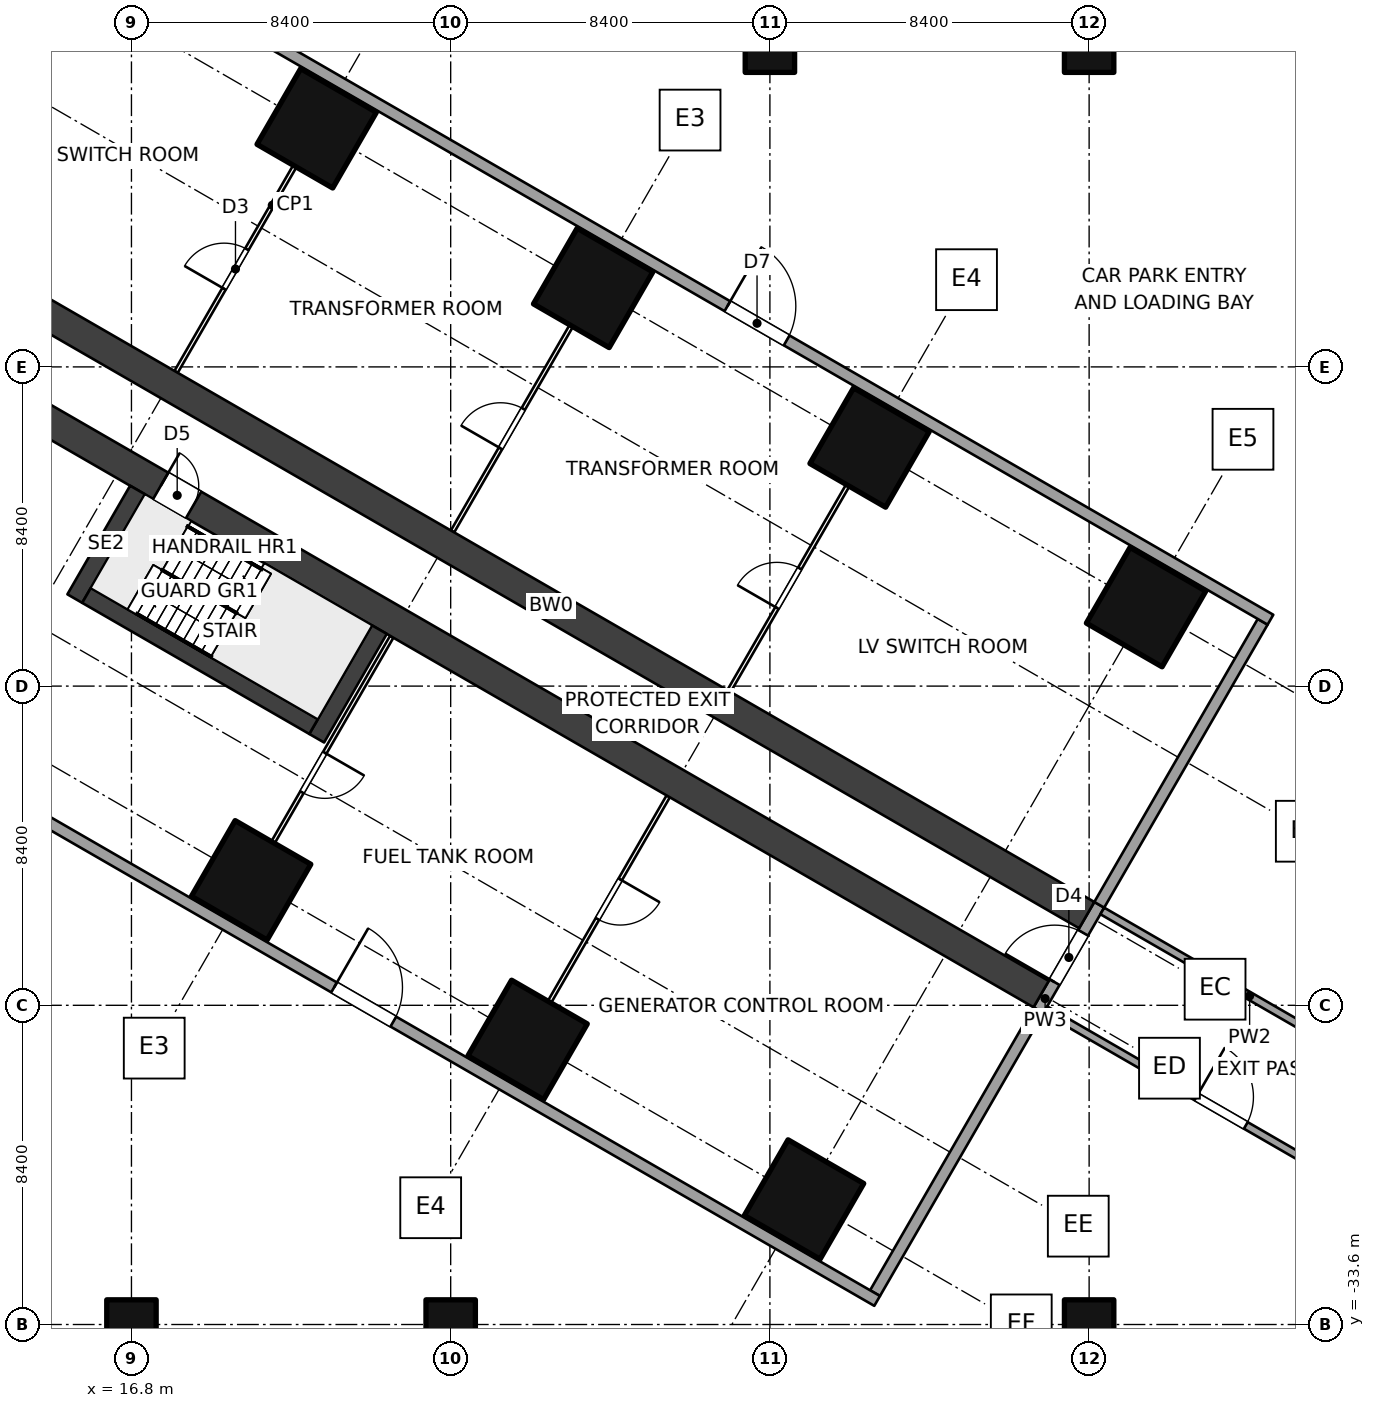
"""IFC4 building model, lengths in metres.
Left out: names, types, materials, properties, quantities, classifications, styles, units other than length and angle.
Written with IfcOpenShell. Run it as: python <this file> out.ifc"""

import sys

from ifc_helpers import new_model, si_unit, direction, frame, frame_2d, origin, origin_2d, place, context, subcontext, project, spatial, rectangle, extrude, element, fill, save


model = new_model("IFC4")
c1 = context("Model", 3, precision=1e-05, world=origin(), true_north=direction((0.0, 1.0)))
c2 = subcontext(c1, "Body", "Model", "MODEL_VIEW")
j1 = project(units=[si_unit("LENGTHUNIT", "METRE"), si_unit("PLANEANGLEUNIT", "RADIAN")], contexts=[c1])
p1 = place(None, origin())
s1 = spatial("IfcSite", under=j1, at=p1, CompositionType="ELEMENT")
p2 = place(p1, origin())
s2 = spatial("IfcBuilding", under=s1, at=p2, CompositionType="ELEMENT")
p3 = place(p2, origin())
s3 = spatial("IfcBuildingStorey", under=s2, at=p3, CompositionType="ELEMENT", Elevation=0.0)
for number, where, z_axis, x_axis in (
    (1, (21.675, -2.122, 0.0), (0.0, 0.0, 1.0), (-0.5, -0.866, 0.0)),
    (2, (28.949, -6.322, 0.0), (0.0, 0.0, 1.0), (-0.5, -0.866, 0.0)),
    (3, (19.949, -21.91, 0.0), (0.0, 0.0, 1.0), (-0.5, -0.866, 0.0)),
    (4, (36.224, -10.521, 0.0), (0.0, 0.0, 1.0), (-0.5, -0.866, 0.0)),
    (5, (27.224, -26.11, 0.0), (0.0, 0.0, 1.0), (-0.5, -0.866, 0.0)),
    (6, (43.499, -14.721, 0.0), (0.0, 0.0, 1.0), (-0.5, -0.866, 0.0)),
    (7, (34.499, -30.31, 0.0), (0.0, 0.0, 1.0), (-0.5, -0.866, 0.0)),
):
    element("IfcColumn", number, at=place(p3, frame(where, z_axis=z_axis, x_axis=x_axis)), inside=s3, PredefinedType="COLUMN", context=c2, shape_type="SweptSolid", body=[
        extrude(rectangle(XDim=2.3, YDim=2.3, at=origin_2d()), origin(), (0.0, 0.0, 1.0), 6.0),
    ])
for number, where, z_axis, x_axis in (
    (8, (16.8, -33.6, 0.0), (0.0, 0.0, 1.0), (1.0, 0.0, 0.0)),
    (9, (25.2, -33.6, 0.0), (0.0, 0.0, 1.0), (1.0, 0.0, 0.0)),
    (10, (33.6, 0.0, 0.0), (0.0, 0.0, 1.0), (1.0, 0.0, 0.0)),
    (11, (42.0, -33.6, 0.0), (0.0, 0.0, 1.0), (1.0, 0.0, 0.0)),
    (12, (42.0, 0.0, 0.0), (0.0, 0.0, 1.0), (1.0, 0.0, 0.0)),
):
    element("IfcColumn", number, at=place(p3, frame(where, z_axis=z_axis, x_axis=x_axis)), inside=s3, PredefinedType="COLUMN", context=c2, shape_type="SweptSolid", body=[
        extrude(rectangle(XDim=1.3, YDim=1.3, at=origin_2d()), origin(), (0.0, 0.0, 1.0), 6.0),
    ])
p4 = place(p3, frame((10.11, -4.451, 0.0), z_axis=(0.0, 0.0, 1.0), x_axis=(0.866025284237, -0.500000207062, 0.0)))
e13 = element("IfcWall", 13, at=p4, inside=s3, PredefinedType="SHEAR", context=c2, shape_type="SweptSolid", body=[
    extrude(rectangle(XDim=36.75, YDim=0.8, at=frame_2d((18.375, 0.0))), origin(), (0.0, 0.0, 1.0), 6.0),
])
p5 = place(p4, frame((2.85, 0.0, 0.0)))
e14 = element("IfcOpeningElement", 14, at=p5, cuts=e13, PredefinedType="OPENING", context=c2, shape_type="SweptSolid", body=[
    extrude(rectangle(XDim=1.2, YDim=2.1, at=frame_2d((0.6, 1.05))), frame((0.0, 0.41, 0.0), z_axis=(0.0, -1.0, 0.0), x_axis=(1.0, 0.0, 0.0)), (0.0, 0.0, 1.0), 0.82),
])
p6 = place(p3, frame((8.91, -6.53, 0.0), z_axis=(0.0, 0.0, 1.0), x_axis=(0.866025284237, -0.500000207062, 0.0)))
e15 = element("IfcWall", 15, at=p6, inside=s3, PredefinedType="SHEAR", context=c2, shape_type="SweptSolid", body=[
    extrude(rectangle(XDim=36.75, YDim=0.8, at=frame_2d((18.375, 0.0))), origin(), (0.0, 0.0, 1.0), 6.0),
])
p7 = place(p6, frame((10.0, 0.0, 0.0)))
e16 = element("IfcOpeningElement", 16, at=p7, cuts=e15, PredefinedType="OPENING", context=c2, shape_type="SweptSolid", body=[
    extrude(rectangle(XDim=1.0, YDim=2.1, at=frame_2d((0.5, 1.05))), frame((0.0, 0.41, 0.0), z_axis=(0.0, -1.0, 0.0), x_axis=(1.0, 0.0, 0.0)), (0.0, 0.0, 1.0), 0.82),
])
p8 = place(p6, frame((2.85, 0.0, 0.0)))
e17 = element("IfcOpeningElement", 17, at=p8, cuts=e15, PredefinedType="OPENING", context=c2, shape_type="SweptSolid", body=[
    extrude(rectangle(XDim=1.2, YDim=2.1, at=frame_2d((0.6, 1.05))), frame((0.0, 0.41, 0.0), z_axis=(0.0, -1.0, 0.0), x_axis=(1.0, 0.0, 0.0)), (0.0, 0.0, 1.0), 0.82),
])
p9 = place(p3, frame((17.975, -8.53, 0.0), z_axis=(0.0, 0.0, 1.0), x_axis=(0.500004234368, 0.866022959057, 0.0)))
e18 = element("IfcWall", 18, at=p9, inside=s3, PredefinedType="PARTITIONING", context=c2, shape_type="SweptSolid", body=[
    extrude(rectangle(XDim=6.25, YDim=0.1, at=frame_2d((3.125, 0.0))), origin(), (0.0, 0.0, 1.0), 3.9),
])
p10 = place(p9, frame((2.525, 0.0, 0.0)))
e19 = element("IfcOpeningElement", 19, at=p10, cuts=e18, PredefinedType="OPENING", context=c2, shape_type="SweptSolid", body=[
    extrude(rectangle(XDim=1.2, YDim=2.1, at=frame_2d((0.6, 1.05))), frame((0.0, 0.06, 0.0), z_axis=(0.0, -1.0, 0.0), x_axis=(1.0, 0.0, 0.0)), (0.0, 0.0, 1.0), 0.12),
])
p11 = place(p3, frame((25.249, -12.73, 0.0), z_axis=(0.0, 0.0, 1.0), x_axis=(0.499987320047, 0.866032724435, 0.0)))
e20 = element("IfcWall", 20, at=p11, inside=s3, PredefinedType="PARTITIONING", context=c2, shape_type="SweptSolid", body=[
    extrude(rectangle(XDim=6.25, YDim=0.1, at=frame_2d((3.125, 0.0))), origin(), (0.0, 0.0, 1.0), 3.9),
])
p12 = place(p11, frame((2.525, 0.0, 0.0)))
e21 = element("IfcOpeningElement", 21, at=p12, cuts=e20, PredefinedType="OPENING", context=c2, shape_type="SweptSolid", body=[
    extrude(rectangle(XDim=1.2, YDim=2.1, at=frame_2d((0.6, 1.05))), frame((0.0, 0.06, 0.0), z_axis=(0.0, -1.0, 0.0), x_axis=(1.0, 0.0, 0.0)), (0.0, 0.0, 1.0), 0.12),
])
p13 = place(p3, frame((32.524, -16.93, 0.0), z_axis=(0.0, 0.0, 1.0), x_axis=(0.500004234368, 0.866022959057, 0.0)))
e22 = element("IfcWall", 22, at=p13, inside=s3, PredefinedType="PARTITIONING", context=c2, shape_type="SweptSolid", body=[
    extrude(rectangle(XDim=6.25, YDim=0.1, at=frame_2d((3.125, 0.0))), origin(), (0.0, 0.0, 1.0), 3.9),
])
p14 = place(p13, frame((2.525, 0.0, 0.0)))
e23 = element("IfcOpeningElement", 23, at=p14, cuts=e22, PredefinedType="OPENING", context=c2, shape_type="SweptSolid", body=[
    extrude(rectangle(XDim=1.2, YDim=2.1, at=frame_2d((0.6, 1.05))), frame((0.0, 0.06, 0.0), z_axis=(0.0, -1.0, 0.0), x_axis=(1.0, 0.0, 0.0)), (0.0, 0.0, 1.0), 0.12),
])
p15 = place(p3, frame((23.649, -15.501, 0.0), z_axis=(0.0, 0.0, 1.0), x_axis=(-0.500004234368, -0.866022959057, 0.0)))
e24 = element("IfcWall", 24, at=p15, inside=s3, PredefinedType="PARTITIONING", context=c2, shape_type="SweptSolid", body=[
    extrude(rectangle(XDim=6.25, YDim=0.1, at=frame_2d((3.125, 0.0))), origin(), (0.0, 0.0, 1.0), 3.9),
])
p16 = place(p15, frame((3.525, 0.0, 0.0)))
e25 = element("IfcOpeningElement", 25, at=p16, cuts=e24, PredefinedType="OPENING", context=c2, shape_type="SweptSolid", body=[
    extrude(rectangle(XDim=1.2, YDim=2.1, at=frame_2d((0.6, 1.05))), frame((0.0, 0.06, 0.0), z_axis=(0.0, -1.0, 0.0), x_axis=(1.0, 0.0, 0.0)), (0.0, 0.0, 1.0), 0.12),
])
p17 = place(p3, frame((30.924, -19.701, 0.0), z_axis=(0.0, 0.0, 1.0), x_axis=(-0.500004234368, -0.866022959057, 0.0)))
e26 = element("IfcWall", 26, at=p17, inside=s3, PredefinedType="PARTITIONING", context=c2, shape_type="SweptSolid", body=[
    extrude(rectangle(XDim=6.25, YDim=0.1, at=frame_2d((3.125, 0.0))), origin(), (0.0, 0.0, 1.0), 3.9),
])
p18 = place(p17, frame((2.525, 0.0, 0.0)))
e27 = element("IfcOpeningElement", 27, at=p18, cuts=e26, PredefinedType="OPENING", context=c2, shape_type="SweptSolid", body=[
    extrude(rectangle(XDim=1.2, YDim=2.1, at=frame_2d((0.6, 1.05))), frame((0.0, 0.06, 0.0), z_axis=(0.0, -1.0, 0.0), x_axis=(1.0, 0.0, 0.0)), (0.0, 0.0, 1.0), 0.12),
])
p19 = place(p3, frame((40.667, -25.326, 0.0), z_axis=(0.0, 0.0, 1.0), x_axis=(0.499971222258, 0.866042017984, 0.0)))
e28 = element("IfcWall", 28, at=p19, inside=s3, PredefinedType="SOLIDWALL", context=c2, shape_type="SweptSolid", body=[
    extrude(rectangle(XDim=3.2, YDim=0.3, at=frame_2d((1.6, 0.0))), origin(), (0.0, 0.0, 1.0), 5.7),
])
p20 = place(p19, frame((0.85, 0.0, 0.0)))
e29 = element("IfcOpeningElement", 29, at=p20, cuts=e28, PredefinedType="OPENING", context=c2, shape_type="SweptSolid", body=[
    extrude(rectangle(XDim=1.5, YDim=2.1, at=frame_2d((0.75, 1.05))), frame((0.0, 0.16, 0.0), z_axis=(0.0, -1.0, 0.0), x_axis=(1.0, 0.0, 0.0)), (0.0, 0.0, 1.0), 0.32),
])
p21 = place(p3, frame((42.346, -22.717, 0.0), z_axis=(0.0, 0.0, 1.0), x_axis=(0.866038004836, -0.499978173704, 0.0)))
e30 = element("IfcWall", 30, at=p21, inside=s3, PredefinedType="SOLIDWALL", context=c2, shape_type="SweptSolid", body=[
    extrude(rectangle(XDim=8.953, YDim=0.2, at=frame_2d((4.477, 0.0))), origin(), (0.0, 0.0, 1.0), 5.7),
])
p22 = place(p3, frame((40.846, -25.315, 0.0), z_axis=(0.0, 0.0, 1.0), x_axis=(0.866028443642, -0.499994734776, 0.0)))
e31 = element("IfcWall", 31, at=p22, inside=s3, PredefinedType="SOLIDWALL", context=c2, shape_type="SweptSolid", body=[
    extrude(rectangle(XDim=10.685, YDim=0.2, at=frame_2d((5.343, 0.0))), origin(), (0.0, 0.0, 1.0), 5.7),
])
p23 = place(p22, frame((4.593, 0.0, 0.0)))
e32 = element("IfcOpeningElement", 32, at=p23, cuts=e31, PredefinedType="OPENING", context=c2, shape_type="SweptSolid", body=[
    extrude(rectangle(XDim=1.5, YDim=2.1, at=frame_2d((0.75, 1.05))), frame((0.0, 0.11, 0.0), z_axis=(0.0, -1.0, 0.0), x_axis=(1.0, 0.0, 0.0)), (0.0, 0.0, 1.0), 0.22),
])
for number, where, z_axis, x_axis in (
    (33, (42.267, -22.555, 0.0), (0.0, 0.0, 1.0), (0.5, 0.866, 0.0)),
    (34, (40.667, -25.326, 0.0), (0.0, 0.0, 1.0), (-0.5, -0.866, 0.0)),
):
    element("IfcWall", number, at=place(p3, frame(where, z_axis=z_axis, x_axis=x_axis)), inside=s3, PredefinedType="SOLIDWALL", context=c2, shape_type="SweptSolid", body=[
        extrude(rectangle(XDim=8.6, YDim=0.3, at=frame_2d((4.3, 0.0))), origin(), (0.0, 0.0, 1.0), 4.1),
    ])
p24 = place(p3, frame((9.45, 6.495, 0.0), z_axis=(0.0, 0.0, 1.0), x_axis=(0.866025301493, -0.500000177174, 0.0)))
e35 = element("IfcWall", 35, at=p24, inside=s3, PredefinedType="SOLIDWALL", context=c2, shape_type="SweptSolid", body=[
    extrude(rectangle(XDim=43.095, YDim=0.3, at=frame_2d((21.548, 0.0))), origin(), (0.0, 0.0, 1.0), 5.7),
])
p25 = place(p24, frame((26.595, 0.0, 0.0)))
e36 = element("IfcOpeningElement", 36, at=p25, cuts=e35, PredefinedType="OPENING", context=c2, shape_type="SweptSolid", body=[
    extrude(rectangle(XDim=1.8, YDim=2.4, at=frame_2d((0.9, 1.2))), frame((0.0, 0.16, 0.0), z_axis=(0.0, -1.0, 0.0), x_axis=(1.0, 0.0, 0.0)), (0.0, 0.0, 1.0), 0.32),
])
p26 = place(p3, frame((-0.9, -11.432, 0.0), z_axis=(0.0, 0.0, 1.0), x_axis=(0.866025301493, -0.500000177174, 0.0)))
e37 = element("IfcWall", 37, at=p26, inside=s3, PredefinedType="SOLIDWALL", context=c2, shape_type="SweptSolid", body=[
    extrude(rectangle(XDim=43.095, YDim=0.3, at=frame_2d((21.548, 0.0))), origin(), (0.0, 0.0, 1.0), 5.7),
])
p27 = place(p26, frame((26.595, 0.0, 0.0)))
e38 = element("IfcOpeningElement", 38, at=p27, cuts=e37, PredefinedType="OPENING", context=c2, shape_type="SweptSolid", body=[
    extrude(rectangle(XDim=1.8, YDim=2.4, at=frame_2d((0.9, 1.2))), frame((0.0, 0.16, 0.0), z_axis=(0.0, -1.0, 0.0), x_axis=(1.0, 0.0, 0.0)), (0.0, 0.0, 1.0), 0.32),
])
for number, where, z_axis, x_axis in (
    (39, (16.959, -11.639, 0.0), (0.0, 0.0, 1.0), (-0.5, -0.866, 0.0)),
    (40, (23.324, -15.314, 0.0), (0.0, 0.0, 1.0), (-0.5, -0.866, 0.0)),
):
    element("IfcWall", number, at=place(p3, frame(where, z_axis=z_axis, x_axis=x_axis)), inside=s3, PredefinedType="SOLIDWALL", context=c2, shape_type="SweptSolid", body=[
        extrude(rectangle(XDim=3.3, YDim=0.45, at=frame_2d((1.65, 0.0))), origin(), (0.0, 0.0, 1.0), 6.0),
    ])
p28 = place(p3, frame((15.616, -14.415, 0.0), z_axis=(0.0, 0.0, 1.0), x_axis=(0.866028853923, -0.499994024137, 0.0)))
e41 = element("IfcWall", 41, at=p28, inside=s3, PredefinedType="SOLIDWALL", context=c2, shape_type="SweptSolid", body=[
    extrude(rectangle(XDim=6.9, YDim=0.45, at=frame_2d((3.45, 0.0))), origin(), (0.0, 0.0, 1.0), 6.0),
])
p29 = place(p7, origin())
e42 = element("IfcDoor", 42, at=p29, inside=s3, OperationType="SINGLE_SWING_LEFT", PredefinedType="DOOR", context=c2, shape_type="SweptSolid", body=[
    extrude(rectangle(XDim=1.0, YDim=2.1, at=frame_2d((0.5, 1.05))), frame((0.0, 0.025, 0.0), z_axis=(0.0, -1.0, 0.0), x_axis=(1.0, 0.0, 0.0)), (0.0, 0.0, 1.0), 0.05),
])
fill(e16, e42)
p30 = place(p10, origin())
e43 = element("IfcDoor", 43, at=p30, inside=s3, OperationType="DOUBLE_SWING_LEFT", PredefinedType="DOOR", context=c2, shape_type="SweptSolid", body=[
    extrude(rectangle(XDim=1.2, YDim=2.1, at=frame_2d((0.6, 1.05))), frame((0.0, 0.025, 0.0), z_axis=(0.0, -1.0, 0.0), x_axis=(1.0, 0.0, 0.0)), (0.0, 0.0, 1.0), 0.05),
])
fill(e19, e43)
p31 = place(p12, origin())
e44 = element("IfcDoor", 44, at=p31, inside=s3, OperationType="DOUBLE_SWING_LEFT", PredefinedType="DOOR", context=c2, shape_type="SweptSolid", body=[
    extrude(rectangle(XDim=1.2, YDim=2.1, at=frame_2d((0.6, 1.05))), frame((0.0, 0.025, 0.0), z_axis=(0.0, -1.0, 0.0), x_axis=(1.0, 0.0, 0.0)), (0.0, 0.0, 1.0), 0.05),
])
fill(e21, e44)
p32 = place(p14, origin())
e45 = element("IfcDoor", 45, at=p32, inside=s3, OperationType="DOUBLE_SWING_LEFT", PredefinedType="DOOR", context=c2, shape_type="SweptSolid", body=[
    extrude(rectangle(XDim=1.2, YDim=2.1, at=frame_2d((0.6, 1.05))), frame((0.0, 0.025, 0.0), z_axis=(0.0, -1.0, 0.0), x_axis=(1.0, 0.0, 0.0)), (0.0, 0.0, 1.0), 0.05),
])
fill(e23, e45)
p33 = place(p16, origin())
e46 = element("IfcDoor", 46, at=p33, inside=s3, OperationType="DOUBLE_SWING_LEFT", PredefinedType="DOOR", context=c2, shape_type="SweptSolid", body=[
    extrude(rectangle(XDim=1.2, YDim=2.1, at=frame_2d((0.6, 1.05))), frame((0.0, 0.025, 0.0), z_axis=(0.0, -1.0, 0.0), x_axis=(1.0, 0.0, 0.0)), (0.0, 0.0, 1.0), 0.05),
])
fill(e25, e46)
p34 = place(p18, origin())
e47 = element("IfcDoor", 47, at=p34, inside=s3, OperationType="DOUBLE_SWING_LEFT", PredefinedType="DOOR", context=c2, shape_type="SweptSolid", body=[
    extrude(rectangle(XDim=1.2, YDim=2.1, at=frame_2d((0.6, 1.05))), frame((0.0, 0.025, 0.0), z_axis=(0.0, -1.0, 0.0), x_axis=(1.0, 0.0, 0.0)), (0.0, 0.0, 1.0), 0.05),
])
fill(e27, e47)
p35 = place(p20, origin())
e48 = element("IfcDoor", 48, at=p35, inside=s3, OperationType="DOUBLE_DOOR_DOUBLE_SWING", PredefinedType="DOOR", context=c2, shape_type="SweptSolid", body=[
    extrude(rectangle(XDim=1.5, YDim=2.1, at=frame_2d((0.75, 1.05))), frame((0.0, 0.025, 0.0), z_axis=(0.0, -1.0, 0.0), x_axis=(1.0, 0.0, 0.0)), (0.0, 0.0, 1.0), 0.05),
])
fill(e29, e48)
p36 = place(p23, origin())
e49 = element("IfcDoor", 49, at=p36, inside=s3, OperationType="DOUBLE_DOOR_DOUBLE_SWING", PredefinedType="DOOR", context=c2, shape_type="SweptSolid", body=[
    extrude(rectangle(XDim=1.5, YDim=2.1, at=frame_2d((0.75, 1.05))), frame((0.0, 0.025, 0.0), z_axis=(0.0, -1.0, 0.0), x_axis=(1.0, 0.0, 0.0)), (0.0, 0.0, 1.0), 0.05),
])
fill(e32, e49)
p37 = place(p25, origin())
e50 = element("IfcDoor", 50, at=p37, inside=s3, OperationType="DOUBLE_DOOR_DOUBLE_SWING", PredefinedType="DOOR", context=c2, shape_type="SweptSolid", body=[
    extrude(rectangle(XDim=1.8, YDim=2.4, at=frame_2d((0.9, 1.2))), frame((0.0, 0.025, 0.0), z_axis=(0.0, -1.0, 0.0), x_axis=(1.0, 0.0, 0.0)), (0.0, 0.0, 1.0), 0.05),
])
fill(e36, e50)
p38 = place(p27, origin())
e51 = element("IfcDoor", 51, at=p38, inside=s3, OperationType="DOUBLE_DOOR_DOUBLE_SWING", PredefinedType="DOOR", context=c2, shape_type="SweptSolid", body=[
    extrude(rectangle(XDim=1.8, YDim=2.4, at=frame_2d((0.9, 1.2))), frame((0.0, 0.025, 0.0), z_axis=(0.0, -1.0, 0.0), x_axis=(1.0, 0.0, 0.0)), (0.0, 0.0, 1.0), 0.05),
])
fill(e38, e51)
save(model, sys.argv[1])
